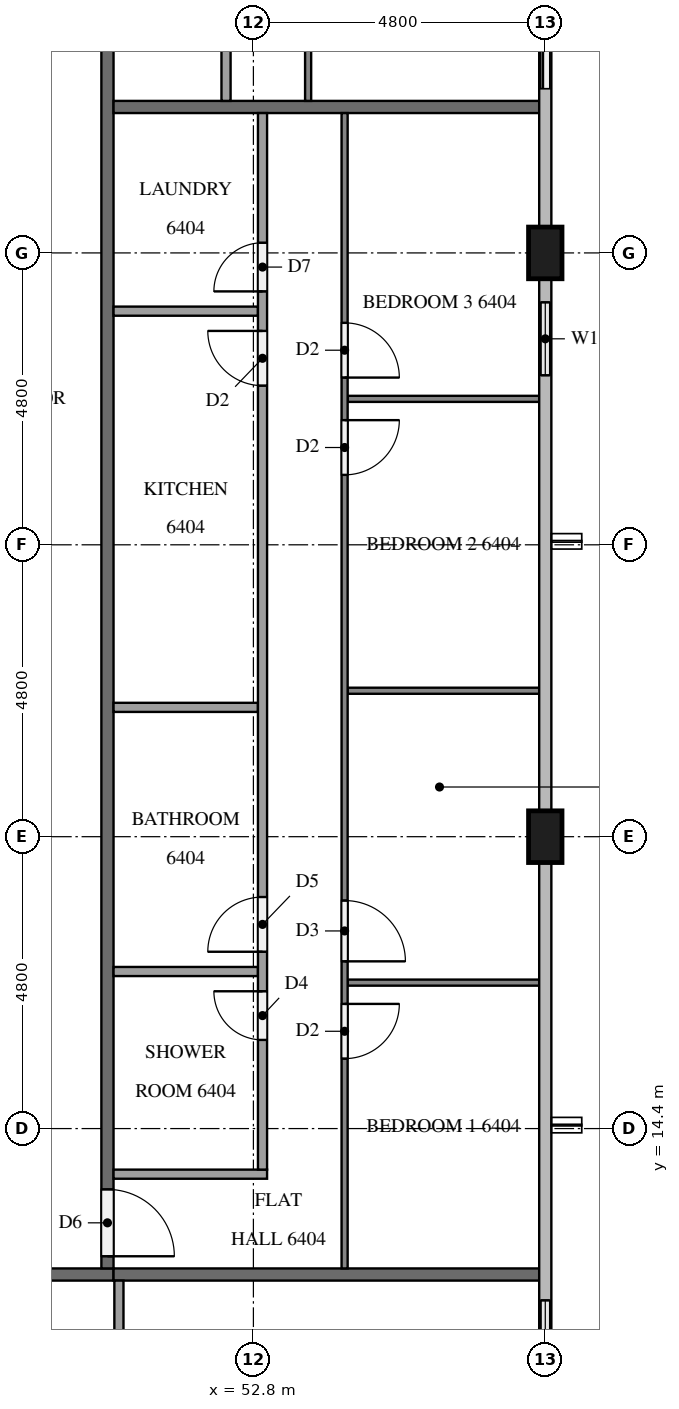
"""IFC4 building model, lengths in metres.
Left out: names, types, materials, properties, quantities, classifications, styles, units other than length and angle.
Written with IfcOpenShell. Run it as: python <this file> out.ifc"""

import sys

from ifc_helpers import new_model, si_unit, direction, frame, frame_2d, origin, origin_2d, place, context, subcontext, project, spatial, rectangle, extrude, element, fill, save


model = new_model("IFC4")
c1 = context("Model", 3, precision=1e-05, world=origin(), true_north=direction((0.0, 1.0)))
c2 = subcontext(c1, "Body", "Model", "MODEL_VIEW")
j1 = project(units=[si_unit("LENGTHUNIT", "METRE"), si_unit("PLANEANGLEUNIT", "RADIAN")], contexts=[c1])
p1 = place(None, origin())
s1 = spatial("IfcSite", under=j1, at=p1, CompositionType="ELEMENT")
p2 = place(p1, origin())
s2 = spatial("IfcBuilding", under=s1, at=p2, CompositionType="ELEMENT")
p3 = place(p2, frame((0.0, 0.0, 245.7)))
s3 = spatial("IfcBuildingStorey", under=s2, at=p3, CompositionType="ELEMENT", Elevation=245.7)
for number, where, z_axis, x_axis in (
    (1, (57.6, 19.2, 0.0), (0.0, 0.0, 1.0), (0.0, 1.0, 0.0)),
    (2, (57.6, 28.8, 0.0), (0.0, 0.0, 1.0), (0.0, 1.0, 0.0)),
):
    element("IfcColumn", number, at=place(p3, frame(where, z_axis=z_axis, x_axis=x_axis)), inside=s3, PredefinedType="COLUMN", context=c2, shape_type="SweptSolid", body=[
        extrude(rectangle(XDim=0.85, YDim=0.55, at=origin_2d()), origin(), (0.0, 0.0, 1.0), 3.2),
    ])
p4 = place(p3, frame((57.6, 9.95, 0.0), z_axis=(0.0, 0.0, 1.0), x_axis=(0.0, 1.0, 0.0)))
e3 = element("IfcWall", 3, at=p4, inside=s3, PredefinedType="SOLIDWALL", context=c2, shape_type="SweptSolid", body=[
    extrude(rectangle(XDim=2.05, YDim=0.15, at=frame_2d((1.025, 0.0))), origin(), (0.0, 0.0, 1.0), 3.2),
])
p5 = place(p4, frame((0.425, 0.0, 0.9)))
e4 = element("IfcOpeningElement", 4, at=p5, cuts=e3, PredefinedType="OPENING", context=c2, shape_type="SweptSolid", body=[
    extrude(rectangle(XDim=1.2, YDim=1.4, at=frame_2d((0.6, 0.7))), frame((0.0, 0.085, 0.0), z_axis=(0.0, -1.0, 0.0), x_axis=(1.0, 0.0, 0.0)), (0.0, 0.0, 1.0), 0.17),
])
p6 = place(p3, frame((57.6, 26.4, 0.0), z_axis=(0.0, 0.0, 1.0), x_axis=(0.0, 1.0, 0.0)))
e5 = element("IfcWall", 5, at=p6, inside=s3, PredefinedType="SOLIDWALL", context=c2, shape_type="SweptSolid", body=[
    extrude(rectangle(XDim=1.975, YDim=0.15, at=frame_2d((0.988, 0.0))), origin(), (0.0, 0.0, 1.0), 3.2),
])
p7 = place(p6, frame((0.387, 0.0, 0.9)))
e6 = element("IfcOpeningElement", 6, at=p7, cuts=e5, PredefinedType="OPENING", context=c2, shape_type="SweptSolid", body=[
    extrude(rectangle(XDim=1.2, YDim=1.4, at=frame_2d((0.6, 0.7))), frame((0.0, 0.085, 0.0), z_axis=(0.0, -1.0, 0.0), x_axis=(1.0, 0.0, 0.0)), (0.0, 0.0, 1.0), 0.17),
])
p8 = place(p3, frame((57.6, 31.2, 0.0), z_axis=(0.0, 0.0, 1.0), x_axis=(0.0, 1.0, 0.0)))
e7 = element("IfcWall", 7, at=p8, inside=s3, PredefinedType="SOLIDWALL", context=c2, shape_type="SweptSolid", body=[
    extrude(rectangle(XDim=2.4, YDim=0.15, at=frame_2d((1.2, 0.0))), origin(), (0.0, 0.0, 1.0), 3.2),
])
p9 = place(p8, frame((0.3, 0.0, 0.0)))
e8 = element("IfcOpeningElement", 8, at=p9, cuts=e7, PredefinedType="OPENING", context=c2, shape_type="SweptSolid", body=[
    extrude(rectangle(XDim=1.8, YDim=2.4, at=frame_2d((0.9, 1.2))), frame((0.0, 0.085, 0.0), z_axis=(0.0, -1.0, 0.0), x_axis=(1.0, 0.0, 0.0)), (0.0, 0.0, 1.0), 0.17),
])
p10 = place(p3, frame((50.5, 12.0, 0.0), z_axis=(0.0, 0.0, 1.0), x_axis=(-1.0, 0.0, 0.0)))
e9 = element("IfcWall", 9, at=p10, inside=s3, PredefinedType="PARTITIONING", context=c2, shape_type="SweptSolid", body=[
    extrude(rectangle(XDim=38.6, YDim=0.2, at=frame_2d((19.3, 0.0))), origin(), (0.0, 0.0, 1.0), 3.2),
])
p11 = place(p10, frame((37.1, 0.0, 0.0)))
e10 = element("IfcOpeningElement", 10, at=p11, cuts=e9, PredefinedType="OPENING", context=c2, shape_type="SweptSolid", body=[
    extrude(rectangle(XDim=1.1, YDim=2.1, at=frame_2d((0.55, 1.05))), frame((0.0, 0.11, 0.0), z_axis=(0.0, -1.0, 0.0), x_axis=(1.0, 0.0, 0.0)), (0.0, 0.0, 1.0), 0.22),
])
p12 = place(p10, frame((17.95, 0.0, 0.0)))
e11 = element("IfcOpeningElement", 11, at=p12, cuts=e9, PredefinedType="OPENING", context=c2, shape_type="SweptSolid", body=[
    extrude(rectangle(XDim=1.0, YDim=2.1, at=frame_2d((0.5, 1.05))), frame((0.0, 0.11, 0.0), z_axis=(0.0, -1.0, 0.0), x_axis=(1.0, 0.0, 0.0)), (0.0, 0.0, 1.0), 0.22),
])
p13 = place(p10, frame((8.35, 0.0, 0.0)))
e12 = element("IfcOpeningElement", 12, at=p13, cuts=e9, PredefinedType="OPENING", context=c2, shape_type="SweptSolid", body=[
    extrude(rectangle(XDim=1.0, YDim=2.1, at=frame_2d((0.5, 1.05))), frame((0.0, 0.11, 0.0), z_axis=(0.0, -1.0, 0.0), x_axis=(1.0, 0.0, 0.0)), (0.0, 0.0, 1.0), 0.22),
])
p14 = place(p3, frame((50.4, 40.7, 0.0), z_axis=(0.0, 0.0, 1.0), x_axis=(0.0, -1.0, 0.0)))
e13 = element("IfcWall", 13, at=p14, inside=s3, PredefinedType="PARTITIONING", context=c2, shape_type="SweptSolid", body=[
    extrude(rectangle(XDim=28.6, YDim=0.2, at=frame_2d((14.3, 0.0))), origin(), (0.0, 0.0, 1.0), 3.2),
])
p15 = place(p14, frame((27.3, 0.0, 0.0)))
e14 = element("IfcOpeningElement", 14, at=p15, cuts=e13, PredefinedType="OPENING", context=c2, shape_type="SweptSolid", body=[
    extrude(rectangle(XDim=1.1, YDim=2.1, at=frame_2d((0.55, 1.05))), frame((0.0, 0.11, 0.0), z_axis=(0.0, -1.0, 0.0), x_axis=(1.0, 0.0, 0.0)), (0.0, 0.0, 1.0), 0.22),
])
p16 = place(p14, frame((0.25, 0.0, 0.0)))
e15 = element("IfcOpeningElement", 15, at=p16, cuts=e13, PredefinedType="OPENING", context=c2, shape_type="SweptSolid", body=[
    extrude(rectangle(XDim=1.0, YDim=2.1, at=frame_2d((0.5, 1.05))), frame((0.0, 0.11, 0.0), z_axis=(0.0, -1.0, 0.0), x_axis=(1.0, 0.0, 0.0)), (0.0, 0.0, 1.0), 0.22),
])
for number, where, z_axis, x_axis in (
    (16, (50.5, 12.0, 0.0), (0.0, 0.0, 1.0), (1.0, 0.0, 0.0)),
    (17, (50.5, 31.2, 0.0), (0.0, 0.0, 1.0), (1.0, 0.0, 0.0)),
):
    element("IfcWall", number, at=place(p3, frame(where, z_axis=z_axis, x_axis=x_axis)), inside=s3, PredefinedType="PARTITIONING", context=c2, shape_type="SweptSolid", body=[
        extrude(rectangle(XDim=7.0, YDim=0.2, at=frame_2d((3.5, 0.0))), origin(), (0.0, 0.0, 1.0), 3.2),
    ])
p17 = place(p3, frame((50.588, 11.9, 0.0), z_axis=(0.0, 0.0, 1.0), x_axis=(0.0, -1.0, 0.0)))
e18 = element("IfcWall", 18, at=p17, inside=s3, PredefinedType="PARTITIONING", context=c2, shape_type="SweptSolid", body=[
    extrude(rectangle(XDim=2.075, YDim=0.15, at=frame_2d((1.038, 0.0))), origin(), (0.0, 0.0, 1.0), 3.2),
])
for number, where, z_axis, x_axis in (
    (19, (54.35, 16.8, 0.0), (0.0, 0.0, 1.0), (1.0, 0.0, 0.0)),
    (20, (54.35, 21.6, 0.0), (0.0, 0.0, 1.0), (1.0, 0.0, 0.0)),
    (21, (54.35, 26.4, 0.0), (0.0, 0.0, 1.0), (1.0, 0.0, 0.0)),
):
    element("IfcWall", number, at=place(p3, frame(where, z_axis=z_axis, x_axis=x_axis)), inside=s3, PredefinedType="PARTITIONING", context=c2, shape_type="SweptSolid", body=[
        extrude(rectangle(XDim=3.15, YDim=0.1, at=frame_2d((1.575, 0.0))), origin(), (0.0, 0.0, 1.0), 3.2),
    ])
p18 = place(p3, frame((54.3, 31.1, 0.0), z_axis=(0.0, 0.0, 1.0), x_axis=(0.0, -1.0, 0.0)))
e22 = element("IfcWall", 22, at=p18, inside=s3, PredefinedType="PARTITIONING", context=c2, shape_type="SweptSolid", body=[
    extrude(rectangle(XDim=19.0, YDim=0.1, at=frame_2d((9.5, 0.0))), origin(), (0.0, 0.0, 1.0), 3.2),
])
p19 = place(p18, frame((14.65, 0.0, 0.0)))
e23 = element("IfcOpeningElement", 23, at=p19, cuts=e22, PredefinedType="OPENING", context=c2, shape_type="SweptSolid", body=[
    extrude(rectangle(XDim=0.9, YDim=2.1, at=frame_2d((0.45, 1.05))), frame((0.0, 0.06, 0.0), z_axis=(0.0, -1.0, 0.0), x_axis=(1.0, 0.0, 0.0)), (0.0, 0.0, 1.0), 0.12),
])
p20 = place(p18, frame((12.95, 0.0, 0.0)))
e24 = element("IfcOpeningElement", 24, at=p20, cuts=e22, PredefinedType="OPENING", context=c2, shape_type="SweptSolid", body=[
    extrude(rectangle(XDim=1.0, YDim=2.1, at=frame_2d((0.5, 1.05))), frame((0.0, 0.06, 0.0), z_axis=(0.0, -1.0, 0.0), x_axis=(1.0, 0.0, 0.0)), (0.0, 0.0, 1.0), 0.12),
])
p21 = place(p18, frame((5.05, 0.0, 0.0)))
e25 = element("IfcOpeningElement", 25, at=p21, cuts=e22, PredefinedType="OPENING", context=c2, shape_type="SweptSolid", body=[
    extrude(rectangle(XDim=0.9, YDim=2.1, at=frame_2d((0.45, 1.05))), frame((0.0, 0.06, 0.0), z_axis=(0.0, -1.0, 0.0), x_axis=(1.0, 0.0, 0.0)), (0.0, 0.0, 1.0), 0.12),
])
p22 = place(p18, frame((3.45, 0.0, 0.0)))
e26 = element("IfcOpeningElement", 26, at=p22, cuts=e22, PredefinedType="OPENING", context=c2, shape_type="SweptSolid", body=[
    extrude(rectangle(XDim=0.9, YDim=2.1, at=frame_2d((0.45, 1.05))), frame((0.0, 0.06, 0.0), z_axis=(0.0, -1.0, 0.0), x_axis=(1.0, 0.0, 0.0)), (0.0, 0.0, 1.0), 0.12),
])
for number, where, z_axis, x_axis in (
    (27, (50.5, 16.983, 0.0), (0.0, 0.0, 1.0), (1.0, 0.0, 0.0)),
    (28, (50.5, 21.327, 0.0), (0.0, 0.0, 1.0), (1.0, 0.0, 0.0)),
    (29, (50.5, 27.842, 0.0), (0.0, 0.0, 1.0), (1.0, 0.0, 0.0)),
):
    element("IfcWall", number, at=place(p3, frame(where, z_axis=z_axis, x_axis=x_axis)), inside=s3, PredefinedType="PARTITIONING", context=c2, shape_type="SweptSolid", body=[
        extrude(rectangle(XDim=2.375, YDim=0.15, at=frame_2d((1.188, 0.0))), origin(), (0.0, 0.0, 1.0), 3.2),
    ])
p23 = place(p3, frame((50.5, 13.65, 0.0), z_axis=(0.0, 0.0, 1.0), x_axis=(1.0, 0.0, 0.0)))
e30 = element("IfcWall", 30, at=p23, inside=s3, PredefinedType="PARTITIONING", context=c2, shape_type="SweptSolid", body=[
    extrude(rectangle(XDim=2.525, YDim=0.15, at=frame_2d((1.262, 0.0))), origin(), (0.0, 0.0, 1.0), 3.2),
])
p24 = place(p3, frame((52.95, 13.725, 0.0), z_axis=(0.0, 0.0, 1.0), x_axis=(0.0, 1.0, 0.0)))
e31 = element("IfcWall", 31, at=p24, inside=s3, PredefinedType="PARTITIONING", context=c2, shape_type="SweptSolid", body=[
    extrude(rectangle(XDim=17.375, YDim=0.15, at=frame_2d((8.688, 0.0))), origin(), (0.0, 0.0, 1.0), 3.2),
])
p25 = place(p24, frame((2.133, 0.0, 0.0)))
e32 = element("IfcOpeningElement", 32, at=p25, cuts=e31, PredefinedType="OPENING", context=c2, shape_type="SweptSolid", body=[
    extrude(rectangle(XDim=0.8, YDim=2.1, at=frame_2d((0.4, 1.05))), frame((0.0, 0.085, 0.0), z_axis=(0.0, -1.0, 0.0), x_axis=(1.0, 0.0, 0.0)), (0.0, 0.0, 1.0), 0.17),
])
p26 = place(p24, frame((3.583, 0.0, 0.0)))
e33 = element("IfcOpeningElement", 33, at=p26, cuts=e31, PredefinedType="OPENING", context=c2, shape_type="SweptSolid", body=[
    extrude(rectangle(XDim=0.9, YDim=2.1, at=frame_2d((0.45, 1.05))), frame((0.0, 0.085, 0.0), z_axis=(0.0, -1.0, 0.0), x_axis=(1.0, 0.0, 0.0)), (0.0, 0.0, 1.0), 0.17),
])
p27 = place(p24, frame((12.892, 0.0, 0.0)))
e34 = element("IfcOpeningElement", 34, at=p27, cuts=e31, PredefinedType="OPENING", context=c2, shape_type="SweptSolid", body=[
    extrude(rectangle(XDim=0.9, YDim=2.1, at=frame_2d((0.45, 1.05))), frame((0.0, 0.085, 0.0), z_axis=(0.0, -1.0, 0.0), x_axis=(1.0, 0.0, 0.0)), (0.0, 0.0, 1.0), 0.17),
])
p28 = place(p24, frame((14.442, 0.0, 0.0)))
e35 = element("IfcOpeningElement", 35, at=p28, cuts=e31, PredefinedType="OPENING", context=c2, shape_type="SweptSolid", body=[
    extrude(rectangle(XDim=0.8, YDim=2.1, at=frame_2d((0.4, 1.05))), frame((0.0, 0.085, 0.0), z_axis=(0.0, -1.0, 0.0), x_axis=(1.0, 0.0, 0.0)), (0.0, 0.0, 1.0), 0.17),
])
p29 = place(p3, frame((53.7, 40.7, 0.0), z_axis=(0.0, 0.0, 1.0), x_axis=(0.0, -1.0, 0.0)))
e36 = element("IfcWall", 36, at=p29, inside=s3, PredefinedType="PARTITIONING", context=c2, shape_type="SweptSolid", body=[
    extrude(rectangle(XDim=9.4, YDim=0.1, at=frame_2d((4.7, 0.0))), origin(), (0.0, 0.0, 1.0), 3.2),
])
p30 = place(p29, frame((3.45, 0.0, 0.0)))
e37 = element("IfcOpeningElement", 37, at=p30, cuts=e36, PredefinedType="OPENING", context=c2, shape_type="SweptSolid", body=[
    extrude(rectangle(XDim=0.9, YDim=2.1, at=frame_2d((0.45, 1.05))), frame((0.0, 0.06, 0.0), z_axis=(0.0, -1.0, 0.0), x_axis=(1.0, 0.0, 0.0)), (0.0, 0.0, 1.0), 0.12),
])
p31 = place(p29, frame((5.05, 0.0, 0.0)))
e38 = element("IfcOpeningElement", 38, at=p31, cuts=e36, PredefinedType="OPENING", context=c2, shape_type="SweptSolid", body=[
    extrude(rectangle(XDim=1.0, YDim=2.1, at=frame_2d((0.5, 1.05))), frame((0.0, 0.06, 0.0), z_axis=(0.0, -1.0, 0.0), x_axis=(1.0, 0.0, 0.0)), (0.0, 0.0, 1.0), 0.12),
])
p32 = place(p3, frame((52.35, 31.3, 0.0), z_axis=(0.0, 0.0, 1.0), x_axis=(0.0, 1.0, 0.0)))
e39 = element("IfcWall", 39, at=p32, inside=s3, PredefinedType="PARTITIONING", context=c2, shape_type="SweptSolid", body=[
    extrude(rectangle(XDim=7.775, YDim=0.15, at=frame_2d((3.887, 0.0))), origin(), (0.0, 0.0, 1.0), 3.2),
])
p33 = place(p32, frame((4.99, 0.0, 0.0)))
e40 = element("IfcOpeningElement", 40, at=p33, cuts=e39, PredefinedType="OPENING", context=c2, shape_type="SweptSolid", body=[
    extrude(rectangle(XDim=0.8, YDim=2.1, at=frame_2d((0.4, 1.05))), frame((0.0, 0.085, 0.0), z_axis=(0.0, -1.0, 0.0), x_axis=(1.0, 0.0, 0.0)), (0.0, 0.0, 1.0), 0.17),
])
p34 = place(p32, frame((3.44, 0.0, 0.0)))
e41 = element("IfcOpeningElement", 41, at=p34, cuts=e39, PredefinedType="OPENING", context=c2, shape_type="SweptSolid", body=[
    extrude(rectangle(XDim=0.9, YDim=2.1, at=frame_2d((0.45, 1.05))), frame((0.0, 0.085, 0.0), z_axis=(0.0, -1.0, 0.0), x_axis=(1.0, 0.0, 0.0)), (0.0, 0.0, 1.0), 0.17),
])
p35 = place(p5, origin())
e42 = element("IfcWindow", 42, at=p35, inside=s3, PartitioningType="SINGLE_PANEL", PredefinedType="WINDOW", context=c2, shape_type="SweptSolid", body=[
    extrude(rectangle(XDim=1.2, YDim=1.4, at=frame_2d((0.6, 0.7))), frame((0.0, 0.03, 0.0), z_axis=(0.0, -1.0, 0.0), x_axis=(1.0, 0.0, 0.0)), (0.0, 0.0, 1.0), 0.06),
])
fill(e4, e42)
p36 = place(p7, origin())
e43 = element("IfcWindow", 43, at=p36, inside=s3, PartitioningType="SINGLE_PANEL", PredefinedType="WINDOW", context=c2, shape_type="SweptSolid", body=[
    extrude(rectangle(XDim=1.2, YDim=1.4, at=frame_2d((0.6, 0.7))), frame((0.0, 0.03, 0.0), z_axis=(0.0, -1.0, 0.0), x_axis=(1.0, 0.0, 0.0)), (0.0, 0.0, 1.0), 0.06),
])
fill(e6, e43)
p37 = place(p9, origin())
e44 = element("IfcDoor", 44, at=p37, inside=s3, OperationType="SLIDING_TO_LEFT", PredefinedType="DOOR", context=c2, shape_type="SweptSolid", body=[
    extrude(rectangle(XDim=1.8, YDim=2.4, at=frame_2d((0.9, 1.2))), frame((0.0, 0.025, 0.0), z_axis=(0.0, -1.0, 0.0), x_axis=(1.0, 0.0, 0.0)), (0.0, 0.0, 1.0), 0.05),
])
fill(e8, e44)
p38 = place(p15, origin())
e45 = element("IfcDoor", 45, at=p38, inside=s3, OperationType="SINGLE_SWING_RIGHT", PredefinedType="DOOR", context=c2, shape_type="SweptSolid", body=[
    extrude(rectangle(XDim=1.1, YDim=2.1, at=frame_2d((0.55, 1.05))), frame((0.0, 0.025, 0.0), z_axis=(0.0, -1.0, 0.0), x_axis=(1.0, 0.0, 0.0)), (0.0, 0.0, 1.0), 0.05),
])
fill(e14, e45)
p39 = place(p19, origin())
e46 = element("IfcDoor", 46, at=p39, inside=s3, OperationType="SINGLE_SWING_LEFT", PredefinedType="DOOR", context=c2, shape_type="SweptSolid", body=[
    extrude(rectangle(XDim=0.9, YDim=2.1, at=frame_2d((0.45, 1.05))), frame((0.0, 0.025, 0.0), z_axis=(0.0, -1.0, 0.0), x_axis=(1.0, 0.0, 0.0)), (0.0, 0.0, 1.0), 0.05),
])
fill(e23, e46)
p40 = place(p20, origin())
e47 = element("IfcDoor", 47, at=p40, inside=s3, OperationType="SINGLE_SWING_RIGHT", PredefinedType="DOOR", context=c2, shape_type="SweptSolid", body=[
    extrude(rectangle(XDim=1.0, YDim=2.1, at=frame_2d((0.5, 1.05))), frame((0.0, 0.025, 0.0), z_axis=(0.0, -1.0, 0.0), x_axis=(1.0, 0.0, 0.0)), (0.0, 0.0, 1.0), 0.05),
])
fill(e24, e47)
p41 = place(p21, origin())
e48 = element("IfcDoor", 48, at=p41, inside=s3, OperationType="SINGLE_SWING_LEFT", PredefinedType="DOOR", context=c2, shape_type="SweptSolid", body=[
    extrude(rectangle(XDim=0.9, YDim=2.1, at=frame_2d((0.45, 1.05))), frame((0.0, 0.025, 0.0), z_axis=(0.0, -1.0, 0.0), x_axis=(1.0, 0.0, 0.0)), (0.0, 0.0, 1.0), 0.05),
])
fill(e25, e48)
p42 = place(p22, origin())
e49 = element("IfcDoor", 49, at=p42, inside=s3, OperationType="SINGLE_SWING_RIGHT", PredefinedType="DOOR", context=c2, shape_type="SweptSolid", body=[
    extrude(rectangle(XDim=0.9, YDim=2.1, at=frame_2d((0.45, 1.05))), frame((0.0, 0.025, 0.0), z_axis=(0.0, -1.0, 0.0), x_axis=(1.0, 0.0, 0.0)), (0.0, 0.0, 1.0), 0.05),
])
fill(e26, e49)
p43 = place(p25, origin())
e50 = element("IfcDoor", 50, at=p43, inside=s3, OperationType="SINGLE_SWING_RIGHT", PredefinedType="DOOR", context=c2, shape_type="SweptSolid", body=[
    extrude(rectangle(XDim=0.8, YDim=2.1, at=frame_2d((0.4, 1.05))), frame((0.0, 0.025, 0.0), z_axis=(0.0, -1.0, 0.0), x_axis=(1.0, 0.0, 0.0)), (0.0, 0.0, 1.0), 0.05),
])
fill(e32, e50)
p44 = place(p26, origin())
e51 = element("IfcDoor", 51, at=p44, inside=s3, OperationType="SINGLE_SWING_LEFT", PredefinedType="DOOR", context=c2, shape_type="SweptSolid", body=[
    extrude(rectangle(XDim=0.9, YDim=2.1, at=frame_2d((0.45, 1.05))), frame((0.0, 0.025, 0.0), z_axis=(0.0, -1.0, 0.0), x_axis=(1.0, 0.0, 0.0)), (0.0, 0.0, 1.0), 0.05),
])
fill(e33, e51)
p45 = place(p27, origin())
e52 = element("IfcDoor", 52, at=p45, inside=s3, OperationType="SINGLE_SWING_RIGHT", PredefinedType="DOOR", context=c2, shape_type="SweptSolid", body=[
    extrude(rectangle(XDim=0.9, YDim=2.1, at=frame_2d((0.45, 1.05))), frame((0.0, 0.025, 0.0), z_axis=(0.0, -1.0, 0.0), x_axis=(1.0, 0.0, 0.0)), (0.0, 0.0, 1.0), 0.05),
])
fill(e34, e52)
p46 = place(p28, origin())
e53 = element("IfcDoor", 53, at=p46, inside=s3, OperationType="SINGLE_SWING_LEFT", PredefinedType="DOOR", context=c2, shape_type="SweptSolid", body=[
    extrude(rectangle(XDim=0.8, YDim=2.1, at=frame_2d((0.4, 1.05))), frame((0.0, 0.025, 0.0), z_axis=(0.0, -1.0, 0.0), x_axis=(1.0, 0.0, 0.0)), (0.0, 0.0, 1.0), 0.05),
])
fill(e35, e53)
save(model, sys.argv[1])
